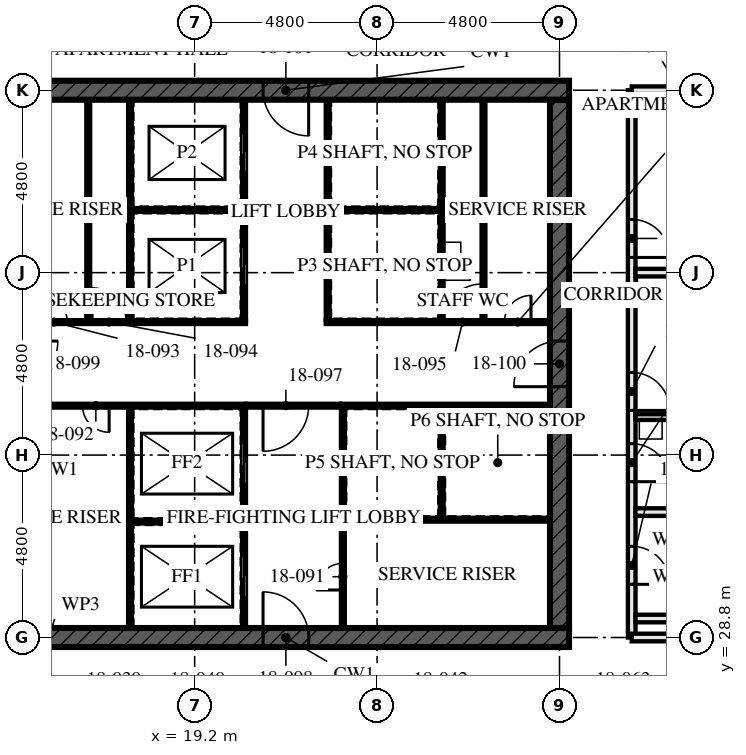
"""IFC4 building model, lengths in metres.
Left out: names, types, materials, properties, quantities, classifications, styles, units other than length and angle.
Written with IfcOpenShell. Run it as: python <this file> out.ifc"""

import sys

from ifc_helpers import new_model, si_unit, direction, frame, frame_2d, origin, place, context, subcontext, project, spatial, rectangle, extrude, element, fill, save


model = new_model("IFC4")
c1 = context("Model", 3, precision=1e-05, world=origin(), true_north=direction((0.0, 1.0)))
c2 = subcontext(c1, "Body", "Model", "MODEL_VIEW")
j1 = project(units=[si_unit("LENGTHUNIT", "METRE"), si_unit("PLANEANGLEUNIT", "RADIAN")], contexts=[c1])
p1 = place(None, origin())
s1 = spatial("IfcSite", under=j1, at=p1, CompositionType="ELEMENT")
p2 = place(p1, origin())
s2 = spatial("IfcBuilding", under=s1, at=p2, CompositionType="ELEMENT")
p3 = place(p2, frame((0.0, 0.0, 69.0)))
s3 = spatial("IfcBuildingStorey", under=s2, at=p3, CompositionType="ELEMENT", Elevation=69.0)
p4 = place(p3, frame((14.15, 28.8, -0.17), z_axis=(0.0, 0.0, 1.0), x_axis=(1.0, 0.0, 0.0)))
e1 = element("IfcWall", 1, at=p4, inside=s3, PredefinedType="SHEAR", context=c2, shape_type="SweptSolid", body=[
    extrude(rectangle(XDim=14.9, YDim=0.5, at=frame_2d((7.45, 0.0))), origin(), (0.0, 0.0, 1.0), 3.5),
])
p5 = place(p4, frame((6.85, 0.0, 0.17)))
e2 = element("IfcOpeningElement", 2, at=p5, cuts=e1, PredefinedType="OPENING", context=c2, shape_type="SweptSolid", body=[
    extrude(rectangle(XDim=1.2, YDim=2.1, at=frame_2d((0.6, 1.05))), frame((0.0, 0.26, 0.0), z_axis=(0.0, -1.0, 0.0), x_axis=(1.0, 0.0, 0.0)), (0.0, 0.0, 1.0), 0.521),
])
p6 = place(p3, frame((29.05, 43.2, -0.17), z_axis=(0.0, 0.0, 1.0), x_axis=(-1.0, 0.0, 0.0)))
e3 = element("IfcWall", 3, at=p6, inside=s3, PredefinedType="SHEAR", context=c2, shape_type="SweptSolid", body=[
    extrude(rectangle(XDim=14.9, YDim=0.5, at=frame_2d((7.45, 0.0))), origin(), (0.0, 0.0, 1.0), 3.5),
])
p7 = place(p6, frame((6.85, 0.0, 0.17)))
e4 = element("IfcOpeningElement", 4, at=p7, cuts=e3, PredefinedType="OPENING", context=c2, shape_type="SweptSolid", body=[
    extrude(rectangle(XDim=1.2, YDim=2.1, at=frame_2d((0.6, 1.05))), frame((0.0, 0.26, 0.0), z_axis=(0.0, -1.0, 0.0), x_axis=(1.0, 0.0, 0.0)), (0.0, 0.0, 1.0), 0.521),
])
p8 = place(p3, frame((28.8, 29.05, -0.17), z_axis=(0.0, 0.0, 1.0), x_axis=(0.0, 1.0, 0.0)))
e5 = element("IfcWall", 5, at=p8, inside=s3, PredefinedType="SHEAR", context=c2, shape_type="SweptSolid", body=[
    extrude(rectangle(XDim=13.9, YDim=0.5, at=frame_2d((6.95, 0.0))), origin(), (0.0, 0.0, 1.0), 3.5),
])
p9 = place(p8, frame((6.35, 0.0, 0.17)))
e6 = element("IfcOpeningElement", 6, at=p9, cuts=e5, PredefinedType="OPENING", context=c2, shape_type="SweptSolid", body=[
    extrude(rectangle(XDim=1.2, YDim=2.1, at=frame_2d((0.6, 1.05))), frame((0.0, 0.26, 0.0), z_axis=(0.0, -1.0, 0.0), x_axis=(1.0, 0.0, 0.0)), (0.0, 0.0, 1.0), 0.521),
])
for number, where, z_axis, x_axis in (
    (7, (35.5, 29.3, 0.0), (0.0, 0.0, 1.0), (-1.0, 0.0, 0.0)),
    (8, (35.5, 32.1, 0.0), (0.0, 0.0, 1.0), (-1.0, 0.0, 0.0)),
):
    element("IfcWall", number, at=place(p3, frame(where, z_axis=z_axis, x_axis=x_axis)), inside=s3, PredefinedType="SOLIDWALL", context=c2, shape_type="SweptSolid", body=[
        extrude(rectangle(XDim=4.7, YDim=0.2, at=frame_2d((2.35, 0.0))), origin(), (0.0, 0.0, 1.0), 2.99),
    ])
p10 = place(p3, frame((33.8, 34.6, 0.0), z_axis=(0.0, 0.0, 1.0), x_axis=(-1.0, 0.0, 0.0)))
e9 = element("IfcWall", 9, at=p10, inside=s3, PredefinedType="PARTITIONING", context=c2, shape_type="SweptSolid", body=[
    extrude(rectangle(XDim=3.0, YDim=0.15, at=frame_2d((1.5, 0.0))), origin(), (0.0, 0.0, 1.0), 3.33),
])
p11 = place(p3, frame((42.88, 38.4, 0.0), z_axis=(0.0, 0.0, 1.0), x_axis=(-1.0, 0.0, 0.0)))
e10 = element("IfcWall", 10, at=p11, inside=s3, PredefinedType="PARTITIONING", context=c2, shape_type="SweptSolid", body=[
    extrude(rectangle(XDim=12.08, YDim=0.2, at=frame_2d((6.04, 0.0))), origin(), (0.0, 0.0, 1.0), 2.55),
])
p12 = place(p3, frame((30.7, 28.8, 0.0), z_axis=(0.0, 0.0, 1.0), x_axis=(0.0, 1.0, 0.0)))
e11 = element("IfcWall", 11, at=p12, inside=s3, PredefinedType="PARTITIONING", context=c2, shape_type="SweptSolid", body=[
    extrude(rectangle(XDim=14.4, YDim=0.2, at=frame_2d((7.2, 0.0))), origin(), (0.0, 0.0, 1.0), 2.55),
])
p13 = place(p12, frame((1.4, 0.0, 0.0)))
e12 = element("IfcOpeningElement", 12, at=p13, cuts=e11, PredefinedType="OPENING", context=c2, shape_type="SweptSolid", body=[
    extrude(rectangle(XDim=1.0, YDim=2.1, at=frame_2d((0.5, 1.05))), frame((0.0, 0.111, 0.0), z_axis=(0.0, -1.0, 0.0), x_axis=(1.0, 0.0, 0.0)), (0.0, 0.0, 1.0), 0.221),
])
p14 = place(p12, frame((4.1, 0.0, 0.0)))
e13 = element("IfcOpeningElement", 13, at=p14, cuts=e11, PredefinedType="OPENING", context=c2, shape_type="SweptSolid", body=[
    extrude(rectangle(XDim=1.0, YDim=2.1, at=frame_2d((0.5, 1.05))), frame((0.0, 0.111, 0.0), z_axis=(0.0, -1.0, 0.0), x_axis=(1.0, 0.0, 0.0)), (0.0, 0.0, 1.0), 0.221),
])
p15 = place(p12, frame((5.975, 0.0, 0.0)))
e14 = element("IfcOpeningElement", 14, at=p15, cuts=e11, PredefinedType="OPENING", context=c2, shape_type="SweptSolid", body=[
    extrude(rectangle(XDim=1.0, YDim=2.1, at=frame_2d((0.5, 1.05))), frame((0.0, 0.111, 0.0), z_axis=(0.0, -1.0, 0.0), x_axis=(1.0, 0.0, 0.0)), (0.0, 0.0, 1.0), 0.221),
])
p16 = place(p12, frame((10.0, 0.0, 0.0)))
e15 = element("IfcOpeningElement", 15, at=p16, cuts=e11, PredefinedType="OPENING", context=c2, shape_type="SweptSolid", body=[
    extrude(rectangle(XDim=1.0, YDim=2.1, at=frame_2d((0.5, 1.05))), frame((0.0, 0.111, 0.0), z_axis=(0.0, -1.0, 0.0), x_axis=(1.0, 0.0, 0.0)), (0.0, 0.0, 1.0), 0.221),
])
for number, where, z_axis, x_axis in (
    (16, (16.4, 37.15, 0.0), (0.0, 0.0, 1.0), (0.0, 1.0, 0.0)),
    (17, (26.8, 37.15, 0.0), (0.0, 0.0, 1.0), (0.0, 1.0, 0.0)),
):
    element("IfcWall", number, at=place(p3, frame(where, z_axis=z_axis, x_axis=x_axis)), inside=s3, PredefinedType="SOLIDWALL", context=c2, shape_type="SweptSolid", body=[
        extrude(rectangle(XDim=5.8, YDim=0.1, at=frame_2d((2.9, 0.0))), origin(), (0.0, 0.0, 1.0), 3.33),
    ])
p17 = place(p3, frame((20.5, 29.05, 0.0), z_axis=(0.0, 0.0, 1.0), x_axis=(0.0, 1.0, 0.0)))
e18 = element("IfcWall", 18, at=p17, inside=s3, PredefinedType="SOLIDWALL", context=c2, shape_type="SweptSolid", body=[
    extrude(rectangle(XDim=5.8, YDim=0.1, at=frame_2d((2.9, 0.0))), origin(), (0.0, 0.0, 1.0), 3.33),
])
p18 = place(p17, frame((0.8, 0.0, 0.0)))
e19 = element("IfcOpeningElement", 19, at=p18, cuts=e18, PredefinedType="OPENING", context=c2, shape_type="SweptSolid", body=[
    extrude(rectangle(XDim=1.1, YDim=2.3, at=frame_2d((0.55, 1.15))), frame((0.0, 0.061, 0.0), z_axis=(0.0, -1.0, 0.0), x_axis=(1.0, 0.0, 0.0)), (0.0, 0.0, 1.0), 0.121),
])
p19 = place(p17, frame((3.775, 0.0, 0.0)))
e20 = element("IfcOpeningElement", 20, at=p19, cuts=e18, PredefinedType="OPENING", context=c2, shape_type="SweptSolid", body=[
    extrude(rectangle(XDim=1.1, YDim=2.3, at=frame_2d((0.55, 1.15))), frame((0.0, 0.061, 0.0), z_axis=(0.0, -1.0, 0.0), x_axis=(1.0, 0.0, 0.0)), (0.0, 0.0, 1.0), 0.121),
])
p20 = place(p3, frame((20.5, 37.15, 0.0), z_axis=(0.0, 0.0, 1.0), x_axis=(0.0, 1.0, 0.0)))
e21 = element("IfcWall", 21, at=p20, inside=s3, PredefinedType="SOLIDWALL", context=c2, shape_type="SweptSolid", body=[
    extrude(rectangle(XDim=5.8, YDim=0.1, at=frame_2d((2.9, 0.0))), origin(), (0.0, 0.0, 1.0), 3.33),
])
p21 = place(p20, frame((0.925, 0.0, 0.0)))
e22 = element("IfcOpeningElement", 22, at=p21, cuts=e21, PredefinedType="OPENING", context=c2, shape_type="SweptSolid", body=[
    extrude(rectangle(XDim=1.0, YDim=2.1, at=frame_2d((0.5, 1.05))), frame((0.0, 0.061, 0.0), z_axis=(0.0, -1.0, 0.0), x_axis=(1.0, 0.0, 0.0)), (0.0, 0.0, 1.0), 0.121),
])
p22 = place(p20, frame((3.9, 0.0, 0.0)))
e23 = element("IfcOpeningElement", 23, at=p22, cuts=e21, PredefinedType="OPENING", context=c2, shape_type="SweptSolid", body=[
    extrude(rectangle(XDim=1.0, YDim=2.1, at=frame_2d((0.5, 1.05))), frame((0.0, 0.061, 0.0), z_axis=(0.0, -1.0, 0.0), x_axis=(1.0, 0.0, 0.0)), (0.0, 0.0, 1.0), 0.121),
])
p23 = place(p3, frame((22.7, 37.15, 0.0), z_axis=(0.0, 0.0, 1.0), x_axis=(0.0, 1.0, 0.0)))
e24 = element("IfcWall", 24, at=p23, inside=s3, PredefinedType="SOLIDWALL", context=c2, shape_type="SweptSolid", body=[
    extrude(rectangle(XDim=5.8, YDim=0.1, at=frame_2d((2.9, 0.0))), origin(), (0.0, 0.0, 1.0), 3.33),
])
p24 = place(p3, frame((23.1, 29.05, 0.0), z_axis=(0.0, 0.0, 1.0), x_axis=(0.0, 1.0, 0.0)))
e25 = element("IfcWall", 25, at=p24, inside=s3, PredefinedType="SOLIDWALL", context=c2, shape_type="SweptSolid", body=[
    extrude(rectangle(XDim=5.8, YDim=0.1, at=frame_2d((2.9, 0.0))), origin(), (0.0, 0.0, 1.0), 3.33),
])
p25 = place(p24, frame((1.0, 0.0, 0.0)))
e26 = element("IfcOpeningElement", 26, at=p25, cuts=e25, PredefinedType="OPENING", context=c2, shape_type="SweptSolid", body=[
    extrude(rectangle(XDim=0.7, YDim=2.1, at=frame_2d((0.35, 1.05))), frame((0.0, 0.061, 0.0), z_axis=(0.0, -1.0, 0.0), x_axis=(1.0, 0.0, 0.0)), (0.0, 0.0, 1.0), 0.121),
])
p26 = place(p3, frame((14.65, 34.9, 0.0), z_axis=(0.0, 0.0, 1.0), x_axis=(1.0, 0.0, 0.0)))
e27 = element("IfcWall", 27, at=p26, inside=s3, PredefinedType="SOLIDWALL", context=c2, shape_type="SweptSolid", body=[
    extrude(rectangle(XDim=5.9, YDim=0.1, at=frame_2d((2.95, 0.0))), origin(), (0.0, 0.0, 1.0), 3.33),
])
p27 = place(p26, frame((1.6, 0.0, 0.0)))
e28 = element("IfcOpeningElement", 28, at=p27, cuts=e27, PredefinedType="OPENING", context=c2, shape_type="SweptSolid", body=[
    extrude(rectangle(XDim=0.7, YDim=2.1, at=frame_2d((0.35, 1.05))), frame((0.0, 0.061, 0.0), z_axis=(0.0, -1.0, 0.0), x_axis=(1.0, 0.0, 0.0)), (0.0, 0.0, 1.0), 0.121),
])
p28 = place(p3, frame((23.05, 34.9, 0.0), z_axis=(0.0, 0.0, 1.0), x_axis=(1.0, 0.0, 0.0)))
e29 = element("IfcWall", 29, at=p28, inside=s3, PredefinedType="SOLIDWALL", context=c2, shape_type="SweptSolid", body=[
    extrude(rectangle(XDim=5.5, YDim=0.1, at=frame_2d((2.75, 0.0))), origin(), (0.0, 0.0, 1.0), 3.33),
])
p29 = place(p3, frame((14.65, 37.1, 0.0), z_axis=(0.0, 0.0, 1.0), x_axis=(1.0, 0.0, 0.0)))
e30 = element("IfcWall", 30, at=p29, inside=s3, PredefinedType="SOLIDWALL", context=c2, shape_type="SweptSolid", body=[
    extrude(rectangle(XDim=5.9, YDim=0.1, at=frame_2d((2.95, 0.0))), origin(), (0.0, 0.0, 1.0), 3.33),
])
p30 = place(p29, frame((0.5, 0.0, 0.0)))
e31 = element("IfcOpeningElement", 31, at=p30, cuts=e30, PredefinedType="OPENING", context=c2, shape_type="SweptSolid", body=[
    extrude(rectangle(XDim=0.7, YDim=2.1, at=frame_2d((0.35, 1.05))), frame((0.0, 0.061, 0.0), z_axis=(0.0, -1.0, 0.0), x_axis=(1.0, 0.0, 0.0)), (0.0, 0.0, 1.0), 0.121),
])
p31 = place(p29, frame((1.85, 0.0, 0.0)))
e32 = element("IfcOpeningElement", 32, at=p31, cuts=e30, PredefinedType="OPENING", context=c2, shape_type="SweptSolid", body=[
    extrude(rectangle(XDim=0.9, YDim=2.1, at=frame_2d((0.45, 1.05))), frame((0.0, 0.061, 0.0), z_axis=(0.0, -1.0, 0.0), x_axis=(1.0, 0.0, 0.0)), (0.0, 0.0, 1.0), 0.121),
])
p32 = place(p3, frame((22.65, 37.1, 0.0), z_axis=(0.0, 0.0, 1.0), x_axis=(1.0, 0.0, 0.0)))
e33 = element("IfcWall", 33, at=p32, inside=s3, PredefinedType="SOLIDWALL", context=c2, shape_type="SweptSolid", body=[
    extrude(rectangle(XDim=5.9, YDim=0.1, at=frame_2d((2.95, 0.0))), origin(), (0.0, 0.0, 1.0), 3.33),
])
p33 = place(p32, frame((3.1, 0.0, 0.0)))
e34 = element("IfcOpeningElement", 34, at=p33, cuts=e33, PredefinedType="OPENING", context=c2, shape_type="SweptSolid", body=[
    extrude(rectangle(XDim=1.0, YDim=2.1, at=frame_2d((0.5, 1.05))), frame((0.0, 0.061, 0.0), z_axis=(0.0, -1.0, 0.0), x_axis=(1.0, 0.0, 0.0)), (0.0, 0.0, 1.0), 0.121),
])
p34 = place(p32, frame((4.7, 0.0, 0.0)))
e35 = element("IfcOpeningElement", 35, at=p34, cuts=e33, PredefinedType="OPENING", context=c2, shape_type="SweptSolid", body=[
    extrude(rectangle(XDim=0.7, YDim=2.1, at=frame_2d((0.35, 1.05))), frame((0.0, 0.061, 0.0), z_axis=(0.0, -1.0, 0.0), x_axis=(1.0, 0.0, 0.0)), (0.0, 0.0, 1.0), 0.121),
])
p35 = place(p3, frame((20.55, 34.9, 0.0), z_axis=(0.0, 0.0, 1.0), x_axis=(1.0, 0.0, 0.0)))
e36 = element("IfcWall", 36, at=p35, inside=s3, PredefinedType="SOLIDWALL", context=c2, shape_type="SweptSolid", body=[
    extrude(rectangle(XDim=2.5, YDim=0.1, at=frame_2d((1.25, 0.0))), origin(), (0.0, 0.0, 1.0), 3.33),
])
p36 = place(p35, frame((0.45, 0.0, 0.0)))
e37 = element("IfcOpeningElement", 37, at=p36, cuts=e36, PredefinedType="OPENING", context=c2, shape_type="SweptSolid", body=[
    extrude(rectangle(XDim=1.2, YDim=2.1, at=frame_2d((0.6, 1.05))), frame((0.0, 0.061, 0.0), z_axis=(0.0, -1.0, 0.0), x_axis=(1.0, 0.0, 0.0)), (0.0, 0.0, 1.0), 0.121),
])
p37 = place(p3, frame((17.5, 29.05, 0.0), z_axis=(0.0, 0.0, 1.0), x_axis=(0.0, 1.0, 0.0)))
e38 = element("IfcWall", 38, at=p37, inside=s3, PredefinedType="SOLIDWALL", context=c2, shape_type="SweptSolid", body=[
    extrude(rectangle(XDim=5.8, YDim=0.1, at=frame_2d((2.9, 0.0))), origin(), (0.0, 0.0, 1.0), 3.33),
])
p38 = place(p3, frame((17.55, 31.85, 0.0), z_axis=(0.0, 0.0, 1.0), x_axis=(1.0, 0.0, 0.0)))
e39 = element("IfcWall", 39, at=p38, inside=s3, PredefinedType="SOLIDWALL", context=c2, shape_type="SweptSolid", body=[
    extrude(rectangle(XDim=2.9, YDim=0.1, at=frame_2d((1.45, 0.0))), origin(), (0.0, 0.0, 1.0), 3.33),
])
p39 = place(p3, frame((17.5, 37.15, 0.0), z_axis=(0.0, 0.0, 1.0), x_axis=(0.0, 1.0, 0.0)))
e40 = element("IfcWall", 40, at=p39, inside=s3, PredefinedType="SOLIDWALL", context=c2, shape_type="SweptSolid", body=[
    extrude(rectangle(XDim=5.8, YDim=0.1, at=frame_2d((2.9, 0.0))), origin(), (0.0, 0.0, 1.0), 3.33),
])
for number, where, z_axis, x_axis in (
    (41, (17.55, 40.05, 0.0), (0.0, 0.0, 1.0), (1.0, 0.0, 0.0)),
    (42, (22.75, 40.05, 0.0), (0.0, 0.0, 1.0), (1.0, 0.0, 0.0)),
):
    element("IfcWall", number, at=place(p3, frame(where, z_axis=z_axis, x_axis=x_axis)), inside=s3, PredefinedType="SOLIDWALL", context=c2, shape_type="SweptSolid", body=[
        extrude(rectangle(XDim=2.9, YDim=0.1, at=frame_2d((1.45, 0.0))), origin(), (0.0, 0.0, 1.0), 3.33),
    ])
p40 = place(p3, frame((25.7, 37.15, 0.0), z_axis=(0.0, 0.0, 1.0), x_axis=(0.0, 1.0, 0.0)))
e43 = element("IfcWall", 43, at=p40, inside=s3, PredefinedType="SOLIDWALL", context=c2, shape_type="SweptSolid", body=[
    extrude(rectangle(XDim=5.8, YDim=0.1, at=frame_2d((2.9, 0.0))), origin(), (0.0, 0.0, 1.0), 3.33),
])
p41 = place(p3, frame((25.7, 31.95, 0.0), z_axis=(0.0, 0.0, 1.0), x_axis=(0.0, 1.0, 0.0)))
e44 = element("IfcWall", 44, at=p41, inside=s3, PredefinedType="SOLIDWALL", context=c2, shape_type="SweptSolid", body=[
    extrude(rectangle(XDim=2.9, YDim=0.1, at=frame_2d((1.45, 0.0))), origin(), (0.0, 0.0, 1.0), 3.33),
])
p42 = place(p3, frame((23.15, 31.9, 0.0), z_axis=(0.0, 0.0, 1.0), x_axis=(1.0, 0.0, 0.0)))
e45 = element("IfcWall", 45, at=p42, inside=s3, PredefinedType="SOLIDWALL", context=c2, shape_type="SweptSolid", body=[
    extrude(rectangle(XDim=5.4, YDim=0.1, at=frame_2d((2.7, 0.0))), origin(), (0.0, 0.0, 1.0), 3.33),
])
for number, where, z_axis, x_axis in (
    (46, (33.205, 28.8, 0.0), (0.0, 0.0, 1.0), (-1.0, 0.0, 0.0)),
    (47, (33.205, 43.2, 0.0), (0.0, 0.0, 1.0), (-1.0, 0.0, 0.0)),
):
    element("IfcWall", number, at=place(p3, frame(where, z_axis=z_axis, x_axis=x_axis)), inside=s3, PredefinedType="PARTITIONING", context=c2, shape_type="SweptSolid", body=[
        extrude(rectangle(XDim=2.505, YDim=0.2, at=frame_2d((1.252, 0.0))), origin(), (0.0, 0.0, 1.0), 2.32),
    ])
p43 = place(p13, frame((1.0, 0.0, 0.0), z_axis=(0.0, 0.0, 1.0), x_axis=(-1.0, 0.0, 0.0)))
e48 = element("IfcDoor", 48, at=p43, inside=s3, OperationType="SINGLE_SWING_LEFT", PredefinedType="DOOR", context=c2, shape_type="SweptSolid", body=[
    extrude(rectangle(XDim=1.0, YDim=2.1, at=frame_2d((0.5, 1.05))), frame((0.0, 0.032, 0.0), z_axis=(0.0, -1.0, 0.0), x_axis=(1.0, 0.0, 0.0)), (0.0, 0.0, 1.0), 0.064),
])
fill(e12, e48)
p44 = place(p14, frame((1.0, 0.0, 0.0), z_axis=(0.0, 0.0, 1.0), x_axis=(-1.0, 0.0, 0.0)))
e49 = element("IfcDoor", 49, at=p44, inside=s3, OperationType="SINGLE_SWING_LEFT", PredefinedType="DOOR", context=c2, shape_type="SweptSolid", body=[
    extrude(rectangle(XDim=1.0, YDim=2.1, at=frame_2d((0.5, 1.05))), frame((0.0, 0.027, 0.0), z_axis=(0.0, -1.0, 0.0), x_axis=(1.0, 0.0, 0.0)), (0.0, 0.0, 1.0), 0.054),
])
fill(e13, e49)
p45 = place(p15, frame((1.0, 0.0, 0.0), z_axis=(0.0, 0.0, 1.0), x_axis=(-1.0, 0.0, 0.0)))
e50 = element("IfcDoor", 50, at=p45, inside=s3, OperationType="SINGLE_SWING_LEFT", PredefinedType="DOOR", context=c2, shape_type="SweptSolid", body=[
    extrude(rectangle(XDim=1.0, YDim=2.1, at=frame_2d((0.5, 1.05))), frame((0.0, 0.027, 0.0), z_axis=(0.0, -1.0, 0.0), x_axis=(1.0, 0.0, 0.0)), (0.0, 0.0, 1.0), 0.054),
])
fill(e14, e50)
p46 = place(p16, frame((1.0, 0.0, 0.0), z_axis=(0.0, 0.0, 1.0), x_axis=(-1.0, 0.0, 0.0)))
e51 = element("IfcDoor", 51, at=p46, inside=s3, OperationType="SINGLE_SWING_LEFT", PredefinedType="DOOR", context=c2, shape_type="SweptSolid", body=[
    extrude(rectangle(XDim=1.0, YDim=2.1, at=frame_2d((0.5, 1.05))), frame((0.0, 0.027, 0.0), z_axis=(0.0, -1.0, 0.0), x_axis=(1.0, 0.0, 0.0)), (0.0, 0.0, 1.0), 0.054),
])
fill(e15, e51)
p47 = place(p18, origin())
e52 = element("IfcDoor", 52, at=p47, inside=s3, OperationType="SLIDING_TO_LEFT", PredefinedType="DOOR", context=c2, shape_type="SweptSolid", body=[
    extrude(rectangle(XDim=1.1, YDim=2.3, at=frame_2d((0.55, 1.15))), frame((0.0, 0.05, 0.0), z_axis=(0.0, -1.0, 0.0), x_axis=(1.0, 0.0, 0.0)), (0.0, 0.0, 1.0), 0.1),
])
fill(e19, e52)
p48 = place(p19, origin())
e53 = element("IfcDoor", 53, at=p48, inside=s3, OperationType="SLIDING_TO_LEFT", PredefinedType="DOOR", context=c2, shape_type="SweptSolid", body=[
    extrude(rectangle(XDim=1.1, YDim=2.3, at=frame_2d((0.55, 1.15))), frame((0.0, 0.05, 0.0), z_axis=(0.0, -1.0, 0.0), x_axis=(1.0, 0.0, 0.0)), (0.0, 0.0, 1.0), 0.1),
])
fill(e20, e53)
p49 = place(p21, origin())
e54 = element("IfcDoor", 54, at=p49, inside=s3, OperationType="SLIDING_TO_LEFT", PredefinedType="DOOR", context=c2, shape_type="SweptSolid", body=[
    extrude(rectangle(XDim=1.0, YDim=2.1, at=frame_2d((0.5, 1.05))), frame((0.0, 0.05, 0.0), z_axis=(0.0, -1.0, 0.0), x_axis=(1.0, 0.0, 0.0)), (0.0, 0.0, 1.0), 0.1),
])
fill(e22, e54)
p50 = place(p22, origin())
e55 = element("IfcDoor", 55, at=p50, inside=s3, OperationType="SLIDING_TO_LEFT", PredefinedType="DOOR", context=c2, shape_type="SweptSolid", body=[
    extrude(rectangle(XDim=1.0, YDim=2.1, at=frame_2d((0.5, 1.05))), frame((0.0, 0.05, 0.0), z_axis=(0.0, -1.0, 0.0), x_axis=(1.0, 0.0, 0.0)), (0.0, 0.0, 1.0), 0.1),
])
fill(e23, e55)
p51 = place(p25, origin())
e56 = element("IfcDoor", 56, at=p51, inside=s3, OperationType="SINGLE_SWING_RIGHT", PredefinedType="DOOR", context=c2, shape_type="SweptSolid", body=[
    extrude(rectangle(XDim=0.7, YDim=2.1, at=frame_2d((0.35, 1.05))), frame((0.0, 0.027, 0.0), z_axis=(0.0, -1.0, 0.0), x_axis=(1.0, 0.0, 0.0)), (0.0, 0.0, 1.0), 0.054),
])
fill(e26, e56)
p52 = place(p27, frame((0.7, 0.0, 0.0), z_axis=(0.0, 0.0, 1.0), x_axis=(-1.0, 0.0, 0.0)))
e57 = element("IfcDoor", 57, at=p52, inside=s3, OperationType="SINGLE_SWING_RIGHT", PredefinedType="DOOR", context=c2, shape_type="SweptSolid", body=[
    extrude(rectangle(XDim=0.7, YDim=2.1, at=frame_2d((0.35, 1.05))), frame((0.0, 0.027, 0.0), z_axis=(0.0, -1.0, 0.0), x_axis=(1.0, 0.0, 0.0)), (0.0, 0.0, 1.0), 0.054),
])
fill(e28, e57)
p53 = place(p30, origin())
e58 = element("IfcDoor", 58, at=p53, inside=s3, OperationType="SINGLE_SWING_RIGHT", PredefinedType="DOOR", context=c2, shape_type="SweptSolid", body=[
    extrude(rectangle(XDim=0.7, YDim=2.1, at=frame_2d((0.35, 1.05))), frame((0.0, 0.027, 0.0), z_axis=(0.0, -1.0, 0.0), x_axis=(1.0, 0.0, 0.0)), (0.0, 0.0, 1.0), 0.054),
])
fill(e31, e58)
p54 = place(p31, origin())
e59 = element("IfcDoor", 59, at=p54, inside=s3, OperationType="SINGLE_SWING_RIGHT", PredefinedType="DOOR", context=c2, shape_type="SweptSolid", body=[
    extrude(rectangle(XDim=0.9, YDim=2.1, at=frame_2d((0.45, 1.05))), frame((0.0, 0.027, 0.0), z_axis=(0.0, -1.0, 0.0), x_axis=(1.0, 0.0, 0.0)), (0.0, 0.0, 1.0), 0.054),
])
fill(e32, e59)
p55 = place(p33, origin())
e60 = element("IfcDoor", 60, at=p55, inside=s3, OperationType="SINGLE_SWING_LEFT", PredefinedType="DOOR", context=c2, shape_type="SweptSolid", body=[
    extrude(rectangle(XDim=1.0, YDim=2.1, at=frame_2d((0.5, 1.05))), frame((0.0, 0.027, 0.0), z_axis=(0.0, -1.0, 0.0), x_axis=(1.0, 0.0, 0.0)), (0.0, 0.0, 1.0), 0.054),
])
fill(e34, e60)
p56 = place(p34, origin())
e61 = element("IfcDoor", 61, at=p56, inside=s3, OperationType="SINGLE_SWING_LEFT", PredefinedType="DOOR", context=c2, shape_type="SweptSolid", body=[
    extrude(rectangle(XDim=0.7, YDim=2.1, at=frame_2d((0.35, 1.05))), frame((0.0, 0.027, 0.0), z_axis=(0.0, -1.0, 0.0), x_axis=(1.0, 0.0, 0.0)), (0.0, 0.0, 1.0), 0.054),
])
fill(e35, e61)
p57 = place(p36, frame((1.2, 0.0, 0.0), z_axis=(0.0, 0.0, 1.0), x_axis=(-1.0, 0.0, 0.0)))
e62 = element("IfcDoor", 62, at=p57, inside=s3, OperationType="SINGLE_SWING_LEFT", PredefinedType="DOOR", context=c2, shape_type="SweptSolid", body=[
    extrude(rectangle(XDim=1.2, YDim=2.1, at=frame_2d((0.6, 1.05))), frame((0.0, 0.027, 0.0), z_axis=(0.0, -1.0, 0.0), x_axis=(1.0, 0.0, 0.0)), (0.0, 0.0, 1.0), 0.054),
])
fill(e37, e62)
p58 = place(p5, origin())
e63 = element("IfcDoor", 63, at=p58, inside=s3, OperationType="SINGLE_SWING_LEFT", PredefinedType="DOOR", context=c2, shape_type="SweptSolid", body=[
    extrude(rectangle(XDim=1.2, YDim=2.1, at=frame_2d((0.6, 1.05))), frame((0.0, 0.027, 0.0), z_axis=(0.0, -1.0, 0.0), x_axis=(1.0, 0.0, 0.0)), (0.0, 0.0, 1.0), 0.054),
])
fill(e2, e63)
p59 = place(p9, origin())
e64 = element("IfcDoor", 64, at=p59, inside=s3, OperationType="SINGLE_SWING_LEFT", PredefinedType="DOOR", context=c2, shape_type="SweptSolid", body=[
    extrude(rectangle(XDim=1.2, YDim=2.1, at=frame_2d((0.6, 1.05))), frame((0.0, 0.027, 0.0), z_axis=(0.0, -1.0, 0.0), x_axis=(1.0, 0.0, 0.0)), (0.0, 0.0, 1.0), 0.054),
])
fill(e6, e64)
p60 = place(p7, origin())
e65 = element("IfcDoor", 65, at=p60, inside=s3, OperationType="SINGLE_SWING_LEFT", PredefinedType="DOOR", context=c2, shape_type="SweptSolid", body=[
    extrude(rectangle(XDim=1.2, YDim=2.1, at=frame_2d((0.6, 1.05))), frame((0.0, 0.027, 0.0), z_axis=(0.0, -1.0, 0.0), x_axis=(1.0, 0.0, 0.0)), (0.0, 0.0, 1.0), 0.054),
])
fill(e4, e65)
save(model, sys.argv[1])
